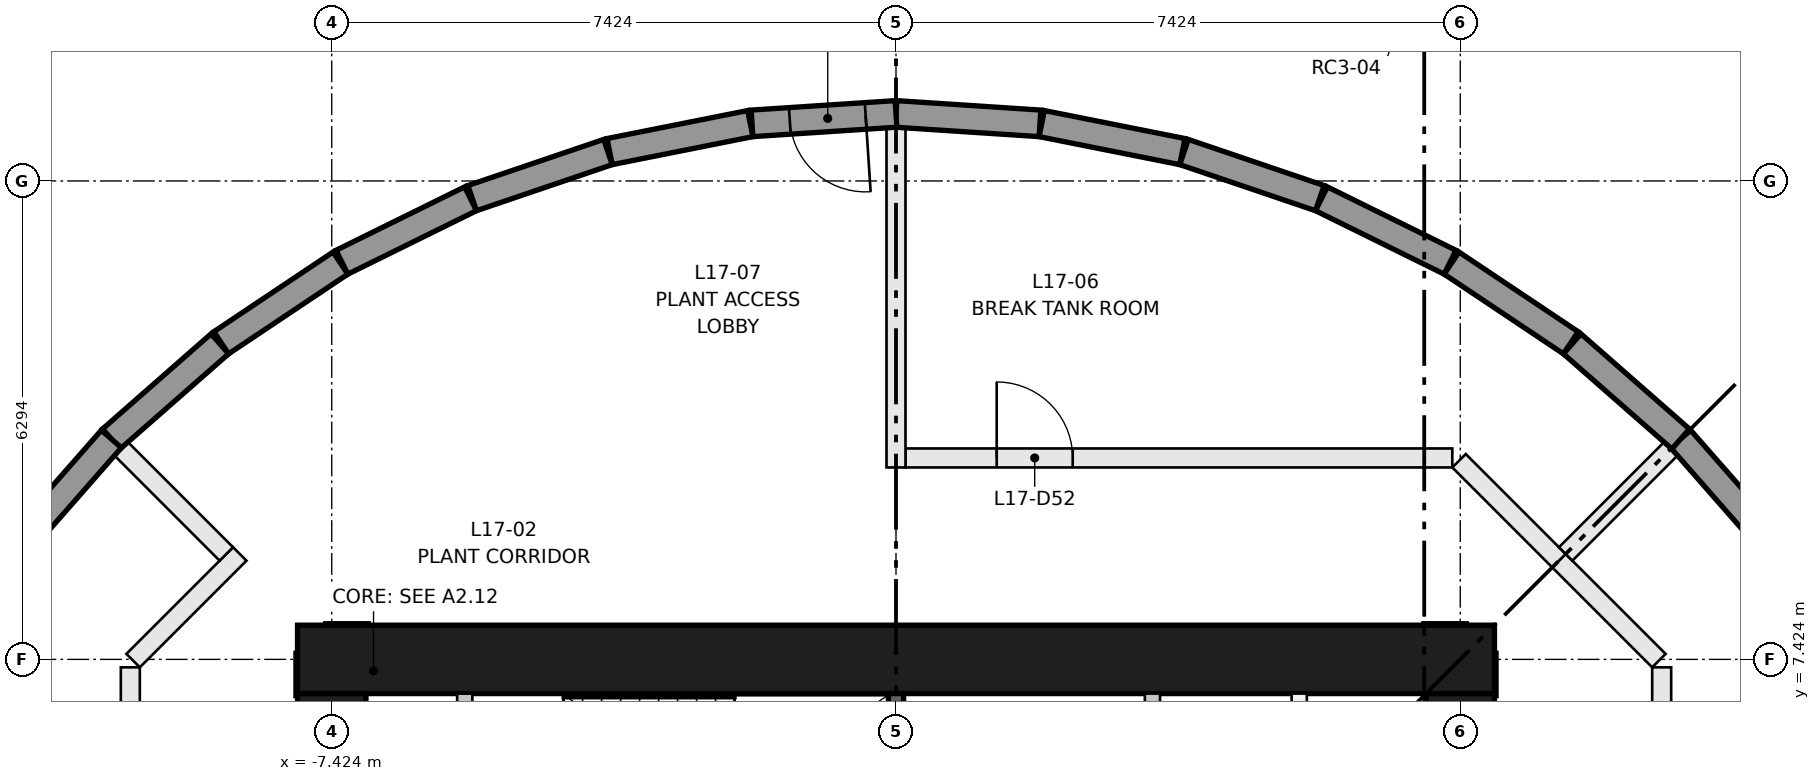
"""IFC4 building model, lengths in metres.
Left out: names, types, materials, properties, quantities, classifications, styles, units other than length and angle.
Written with IfcOpenShell. Run it as: python <this file> out.ifc"""

import sys

from ifc_helpers import new_model, si_unit, direction, frame, frame_2d, origin, place, context, subcontext, project, spatial, rectangle, extrude, element, fill, save


model = new_model("IFC4")
c1 = context("Model", 3, precision=1e-05, world=origin(), true_north=direction((0.0, 1.0)))
c2 = subcontext(c1, "Body", "Model", "MODEL_VIEW")
j1 = project(units=[si_unit("LENGTHUNIT", "METRE"), si_unit("PLANEANGLEUNIT", "RADIAN")], contexts=[c1])
p1 = place(None, origin())
s1 = spatial("IfcSite", under=j1, at=p1, CompositionType="ELEMENT")
p2 = place(p1, origin())
s2 = spatial("IfcBuilding", under=s1, at=p2, CompositionType="ELEMENT")
p3 = place(p2, frame((0.0, 0.0, 66.35)))
s3 = spatial("IfcBuildingStorey", under=s2, at=p3, CompositionType="ELEMENT", Elevation=66.35)
p4 = place(p3, frame((-7.874, 7.424, 0.0), z_axis=(0.0, 0.0, 1.0), x_axis=(1.0, 0.0, 0.0)))
e1 = element("IfcWall", 1, at=p4, inside=s3, PredefinedType="SHEAR", context=c2, shape_type="SweptSolid", body=[
    extrude(rectangle(XDim=15.748, YDim=0.9, at=frame_2d((7.874, 0.0))), origin(), (0.0, 0.0, 1.0), 6.4),
])
p5 = place(p3, frame((-7.424, -6.974, 0.0), z_axis=(0.0, 0.0, 1.0), x_axis=(0.0, 1.0, 0.0)))
e2 = element("IfcWall", 2, at=p5, inside=s3, PredefinedType="SHEAR", context=c2, shape_type="SweptSolid", body=[
    extrude(rectangle(XDim=13.948, YDim=0.9, at=frame_2d((6.974, 0.0))), origin(), (0.0, 0.0, 1.0), 6.4),
])
p6 = place(p5, frame((6.474, 0.0, 0.0)))
e3 = element("IfcOpeningElement", 3, at=p6, cuts=e2, PredefinedType="OPENING", context=c2, shape_type="SweptSolid", body=[
    extrude(rectangle(XDim=1.0, YDim=2.1, at=frame_2d((0.5, 1.05))), frame((0.0, 0.46, 0.0), z_axis=(0.0, -1.0, 0.0), x_axis=(1.0, 0.0, 0.0)), (0.0, 0.0, 1.0), 0.92),
])
p7 = place(p5, frame((3.35, 0.0, 0.0)))
e4 = element("IfcOpeningElement", 4, at=p7, cuts=e2, PredefinedType="OPENING", context=c2, shape_type="SweptSolid", body=[
    extrude(rectangle(XDim=1.8, YDim=2.1, at=frame_2d((0.9, 1.05))), frame((0.0, 0.46, 0.0), z_axis=(0.0, -1.0, 0.0), x_axis=(1.0, 0.0, 0.0)), (0.0, 0.0, 1.0), 0.92),
])
p8 = place(p5, frame((8.799, 0.0, 0.0)))
e5 = element("IfcOpeningElement", 5, at=p8, cuts=e2, PredefinedType="OPENING", context=c2, shape_type="SweptSolid", body=[
    extrude(rectangle(XDim=1.8, YDim=2.1, at=frame_2d((0.9, 1.05))), frame((0.0, 0.46, 0.0), z_axis=(0.0, -1.0, 0.0), x_axis=(1.0, 0.0, 0.0)), (0.0, 0.0, 1.0), 0.92),
])
p9 = place(p5, frame((11.974, 0.0, 0.0)))
e6 = element("IfcOpeningElement", 6, at=p9, cuts=e2, PredefinedType="OPENING", context=c2, shape_type="SweptSolid", body=[
    extrude(rectangle(XDim=1.0, YDim=2.1, at=frame_2d((0.5, 1.05))), frame((0.0, 0.46, 0.0), z_axis=(0.0, -1.0, 0.0), x_axis=(1.0, 0.0, 0.0)), (0.0, 0.0, 1.0), 0.92),
])
p10 = place(p3, frame((7.424, -6.974, 0.0), z_axis=(0.0, 0.0, 1.0), x_axis=(0.0, 1.0, 0.0)))
e7 = element("IfcWall", 7, at=p10, inside=s3, PredefinedType="SHEAR", context=c2, shape_type="SweptSolid", body=[
    extrude(rectangle(XDim=13.948, YDim=0.9, at=frame_2d((6.974, 0.0))), origin(), (0.0, 0.0, 1.0), 6.4),
])
p11 = place(p10, frame((6.474, 0.0, 0.0)))
e8 = element("IfcOpeningElement", 8, at=p11, cuts=e7, PredefinedType="OPENING", context=c2, shape_type="SweptSolid", body=[
    extrude(rectangle(XDim=1.0, YDim=2.1, at=frame_2d((0.5, 1.05))), frame((0.0, 0.46, 0.0), z_axis=(0.0, -1.0, 0.0), x_axis=(1.0, 0.0, 0.0)), (0.0, 0.0, 1.0), 0.92),
])
p12 = place(p10, frame((3.35, 0.0, 0.0)))
e9 = element("IfcOpeningElement", 9, at=p12, cuts=e7, PredefinedType="OPENING", context=c2, shape_type="SweptSolid", body=[
    extrude(rectangle(XDim=1.8, YDim=2.1, at=frame_2d((0.9, 1.05))), frame((0.0, 0.46, 0.0), z_axis=(0.0, -1.0, 0.0), x_axis=(1.0, 0.0, 0.0)), (0.0, 0.0, 1.0), 0.92),
])
p13 = place(p10, frame((8.799, 0.0, 0.0)))
e10 = element("IfcOpeningElement", 10, at=p13, cuts=e7, PredefinedType="OPENING", context=c2, shape_type="SweptSolid", body=[
    extrude(rectangle(XDim=1.8, YDim=2.1, at=frame_2d((0.9, 1.05))), frame((0.0, 0.46, 0.0), z_axis=(0.0, -1.0, 0.0), x_axis=(1.0, 0.0, 0.0)), (0.0, 0.0, 1.0), 0.92),
])
p14 = place(p3, frame((0.0, 5.574, 0.0), z_axis=(0.0, 0.0, 1.0), x_axis=(0.0, 1.0, 0.0)))
e11 = element("IfcWall", 11, at=p14, inside=s3, PredefinedType="SHEAR", context=c2, shape_type="SweptSolid", body=[
    extrude(rectangle(XDim=1.4, YDim=0.2, at=frame_2d((0.7, 0.0))), origin(), (0.0, 0.0, 1.0), 6.05),
])
for number, where, z_axis, x_axis in (
    (12, (3.374, 4.174, 0.0), (0.0, 0.0, 1.0), (0.0, 1.0, 0.0)),
    (13, (5.305, 4.174, 0.0), (0.0, 0.0, 1.0), (0.0, 1.0, 0.0)),
):
    element("IfcWall", number, at=place(p3, frame(where, z_axis=z_axis, x_axis=x_axis)), inside=s3, PredefinedType="PARTITIONING", context=c2, shape_type="SweptSolid", body=[
        extrude(rectangle(XDim=2.8, YDim=0.2, at=frame_2d((1.4, 0.0))), origin(), (0.0, 0.0, 1.0), 6.05),
    ])
p15 = place(p3, frame((-5.674, 4.174, 0.0), z_axis=(0.0, 0.0, 1.0), x_axis=(0.0, 1.0, 0.0)))
e14 = element("IfcWall", 14, at=p15, inside=s3, PredefinedType="PARTITIONING", context=c2, shape_type="SweptSolid", body=[
    extrude(rectangle(XDim=2.8, YDim=0.2, at=frame_2d((1.4, 0.0))), origin(), (0.0, 0.0, 1.0), 6.05),
])
p16 = place(p15, frame((0.125, 0.0, 0.0)))
e15 = element("IfcOpeningElement", 15, at=p16, cuts=e14, PredefinedType="OPENING", context=c2, shape_type="SweptSolid", body=[
    extrude(rectangle(XDim=0.95, YDim=2.1, at=frame_2d((0.475, 1.05))), frame((0.0, 0.11, 0.0), z_axis=(0.0, -1.0, 0.0), x_axis=(1.0, 0.0, 0.0)), (0.0, 0.0, 1.0), 0.22),
])
p17 = place(p15, frame((1.725, 0.0, 0.0)))
e16 = element("IfcOpeningElement", 16, at=p17, cuts=e14, PredefinedType="OPENING", context=c2, shape_type="SweptSolid", body=[
    extrude(rectangle(XDim=0.95, YDim=2.1, at=frame_2d((0.475, 1.05))), frame((0.0, 0.11, 0.0), z_axis=(0.0, -1.0, 0.0), x_axis=(1.0, 0.0, 0.0)), (0.0, 0.0, 1.0), 0.22),
])
p18 = place(p3, frame((8.722, 8.722, 0.0), z_axis=(0.0, 0.0, 1.0), x_axis=(0.707172427269, -0.707041129009, 0.0)))
e17 = element("IfcWall", 17, at=p18, inside=s3, PredefinedType="PARTITIONING", context=c2, shape_type="SweptSolid", body=[
    extrude(rectangle(XDim=1.859, YDim=0.25, at=frame_2d((0.93, 0.0))), origin(), (0.0, 0.0, 1.0), 6.05),
])
p19 = place(p3, frame((10.074, 7.319, 0.0), z_axis=(0.0, 0.0, 1.0), x_axis=(0.0, -1.0, 0.0)))
e18 = element("IfcWall", 18, at=p19, inside=s3, PredefinedType="PARTITIONING", context=c2, shape_type="SweptSolid", body=[
    extrude(rectangle(XDim=7.319, YDim=0.25, at=frame_2d((3.66, 0.0))), origin(), (0.0, 0.0, 1.0), 6.05),
])
p20 = place(p19, frame((5.0, 0.0, 0.0)))
e19 = element("IfcOpeningElement", 19, at=p20, cuts=e18, PredefinedType="OPENING", context=c2, shape_type="SweptSolid", body=[
    extrude(rectangle(XDim=1.0, YDim=2.1, at=frame_2d((0.5, 1.05))), frame((0.0, 0.135, 0.0), z_axis=(0.0, -1.0, 0.0), x_axis=(1.0, 0.0, 0.0)), (0.0, 0.0, 1.0), 0.27),
])
p21 = place(p3, frame((0.125, 10.074, 0.0), z_axis=(0.0, 0.0, 1.0), x_axis=(1.0, 0.0, 0.0)))
e20 = element("IfcWall", 20, at=p21, inside=s3, PredefinedType="PARTITIONING", context=c2, shape_type="SweptSolid", body=[
    extrude(rectangle(XDim=7.194, YDim=0.25, at=frame_2d((3.597, 0.0))), origin(), (0.0, 0.0, 1.0), 6.05),
])
p22 = place(p21, frame((1.2, 0.0, 0.0)))
e21 = element("IfcOpeningElement", 21, at=p22, cuts=e20, PredefinedType="OPENING", context=c2, shape_type="SweptSolid", body=[
    extrude(rectangle(XDim=1.0, YDim=2.1, at=frame_2d((0.5, 1.05))), frame((0.0, 0.135, 0.0), z_axis=(0.0, -1.0, 0.0), x_axis=(1.0, 0.0, 0.0)), (0.0, 0.0, 1.0), 0.27),
])
p23 = place(p3, frame((7.408, 10.037, 0.0), z_axis=(0.0, 0.0, 1.0), x_axis=(0.707041129009, -0.707172427269, 0.0)))
e22 = element("IfcWall", 22, at=p23, inside=s3, PredefinedType="PARTITIONING", context=c2, shape_type="SweptSolid", body=[
    extrude(rectangle(XDim=1.859, YDim=0.25, at=frame_2d((0.93, 0.0))), origin(), (0.0, 0.0, 1.0), 6.05),
])
p24 = place(p3, frame((-10.074, 0.0, 0.0), z_axis=(0.0, 0.0, 1.0), x_axis=(0.0, 1.0, 0.0)))
e23 = element("IfcWall", 23, at=p24, inside=s3, PredefinedType="PARTITIONING", context=c2, shape_type="SweptSolid", body=[
    extrude(rectangle(XDim=7.319, YDim=0.25, at=frame_2d((3.66, 0.0))), origin(), (0.0, 0.0, 1.0), 6.05),
])
p25 = place(p24, frame((1.3, 0.0, 0.0)))
e24 = element("IfcOpeningElement", 24, at=p25, cuts=e23, PredefinedType="OPENING", context=c2, shape_type="SweptSolid", body=[
    extrude(rectangle(XDim=1.0, YDim=2.1, at=frame_2d((0.5, 1.05))), frame((0.0, 0.135, 0.0), z_axis=(0.0, -1.0, 0.0), x_axis=(1.0, 0.0, 0.0)), (0.0, 0.0, 1.0), 0.27),
])
p26 = place(p3, frame((-10.037, 7.408, 0.0), z_axis=(0.0, 0.0, 1.0), x_axis=(0.707168292802, 0.70704526422, 0.0)))
e25 = element("IfcWall", 25, at=p26, inside=s3, PredefinedType="PARTITIONING", context=c2, shape_type="SweptSolid", body=[
    extrude(rectangle(XDim=1.984, YDim=0.25, at=frame_2d((0.992, 0.0))), origin(), (0.0, 0.0, 1.0), 6.05),
])
p27 = place(p3, frame((10.324, 10.324, 0.0), z_axis=(0.0, 0.0, 1.0), x_axis=(0.659360034108, -0.751827337506, 0.0)))
e26 = element("IfcWall", 26, at=p27, inside=s3, PredefinedType="PARTITIONING", context=c2, shape_type="SweptSolid", body=[
    extrude(rectangle(XDim=1.898, YDim=0.35, at=frame_2d((0.949, 0.0))), origin(), (0.0, 0.0, 1.0), 6.05),
])
p28 = place(p3, frame((8.811, 8.811, 0.0), z_axis=(0.0, 0.0, 1.0), x_axis=(0.707106781187, 0.707106781187, 0.0)))
e27 = element("IfcWall", 27, at=p28, inside=s3, PredefinedType="PARTITIONING", context=c2, shape_type="SweptSolid", body=[
    extrude(rectangle(XDim=1.956, YDim=0.25, at=frame_2d((0.978, 0.0))), origin(), (0.0, 0.0, 1.0), 6.05),
])
p29 = place(p3, frame((0.0, 14.6, 0.0), z_axis=(0.0, 0.0, 1.0), x_axis=(0.997855159135, -0.065460533058, 0.0)))
e28 = element("IfcWall", 28, at=p29, inside=s3, PredefinedType="PARTITIONING", context=c2, shape_type="SweptSolid", body=[
    extrude(rectangle(XDim=1.898, YDim=0.35, at=frame_2d((0.949, 0.0))), origin(), (0.0, 0.0, 1.0), 6.05),
])
p30 = place(p3, frame((1.917, 14.473, 0.0), z_axis=(0.0, 0.0, 1.0), x_axis=(0.980779232714, -0.195120723342, 0.0)))
e29 = element("IfcWall", 29, at=p30, inside=s3, PredefinedType="PARTITIONING", context=c2, shape_type="SweptSolid", body=[
    extrude(rectangle(XDim=1.887, YDim=0.35, at=frame_2d((0.943, 0.0))), origin(), (0.0, 0.0, 1.0), 6.05),
])
for number, where, z_axis, x_axis in (
    (30, (3.79, 14.099, 0.0), (0.0, 0.0, 1.0), (0.947, -0.322, 0.0)),
    (31, (5.597, 13.483, 0.0), (0.0, 0.0, 1.0), (0.897, -0.442, 0.0)),
):
    element("IfcWall", number, at=place(p3, frame(where, z_axis=z_axis, x_axis=x_axis)), inside=s3, PredefinedType="PARTITIONING", context=c2, shape_type="SweptSolid", body=[
        extrude(rectangle(XDim=1.887, YDim=0.35, at=frame_2d((0.943, 0.0))), origin(), (0.0, 0.0, 1.0), 6.05),
    ])
p31 = place(p3, frame((7.31, 12.638, 0.0), z_axis=(0.0, 0.0, 1.0), x_axis=(0.831452632931, -0.555595643605, 0.0)))
e32 = element("IfcWall", 32, at=p31, inside=s3, PredefinedType="PARTITIONING", context=c2, shape_type="SweptSolid", body=[
    extrude(rectangle(XDim=1.887, YDim=0.35, at=frame_2d((0.943, 0.0))), origin(), (0.0, 0.0, 1.0), 6.05),
])
p32 = place(p3, frame((8.896, 11.575, 0.0), z_axis=(0.0, 0.0, 1.0), x_axis=(0.751827337506, -0.659360034108, 0.0)))
e33 = element("IfcWall", 33, at=p32, inside=s3, PredefinedType="PARTITIONING", context=c2, shape_type="SweptSolid", body=[
    extrude(rectangle(XDim=1.898, YDim=0.35, at=frame_2d((0.949, 0.0))), origin(), (0.0, 0.0, 1.0), 6.05),
])
p33 = place(p3, frame((0.0, 9.949, 0.0), z_axis=(0.0, 0.0, 1.0), x_axis=(0.0, 1.0, 0.0)))
e34 = element("IfcWall", 34, at=p33, inside=s3, PredefinedType="PARTITIONING", context=c2, shape_type="SweptSolid", body=[
    extrude(rectangle(XDim=4.468, YDim=0.25, at=frame_2d((2.234, 0.0))), origin(), (0.0, 0.0, 1.0), 6.05),
])
p34 = place(p3, frame((-10.324, 10.324, 0.0), z_axis=(0.0, 0.0, 1.0), x_axis=(0.751827337506, 0.659360034108, 0.0)))
e35 = element("IfcWall", 35, at=p34, inside=s3, PredefinedType="PARTITIONING", context=c2, shape_type="SweptSolid", body=[
    extrude(rectangle(XDim=1.898, YDim=0.35, at=frame_2d((0.949, 0.0))), origin(), (0.0, 0.0, 1.0), 6.05),
])
p35 = place(p3, frame((-8.878, 11.589, 0.0), z_axis=(0.0, 0.0, 1.0), x_axis=(0.831452632931, 0.555595643605, 0.0)))
e36 = element("IfcWall", 36, at=p35, inside=s3, PredefinedType="PARTITIONING", context=c2, shape_type="SweptSolid", body=[
    extrude(rectangle(XDim=1.887, YDim=0.35, at=frame_2d((0.943, 0.0))), origin(), (0.0, 0.0, 1.0), 6.05),
])
for number, where, z_axis, x_axis in (
    (37, (-7.29, 12.649, 0.0), (0.0, 0.0, 1.0), (0.897, 0.442, 0.0)),
    (38, (-5.576, 13.492, 0.0), (0.0, 0.0, 1.0), (0.947, 0.322, 0.0)),
):
    element("IfcWall", number, at=place(p3, frame(where, z_axis=z_axis, x_axis=x_axis)), inside=s3, PredefinedType="PARTITIONING", context=c2, shape_type="SweptSolid", body=[
        extrude(rectangle(XDim=1.887, YDim=0.35, at=frame_2d((0.943, 0.0))), origin(), (0.0, 0.0, 1.0), 6.05),
    ])
p36 = place(p3, frame((-3.768, 14.105, 0.0), z_axis=(0.0, 0.0, 1.0), x_axis=(0.980779232714, 0.195120723342, 0.0)))
e39 = element("IfcWall", 39, at=p36, inside=s3, PredefinedType="PARTITIONING", context=c2, shape_type="SweptSolid", body=[
    extrude(rectangle(XDim=1.887, YDim=0.35, at=frame_2d((0.943, 0.0))), origin(), (0.0, 0.0, 1.0), 6.05),
])
p37 = place(p3, frame((0.0, 14.6, 0.0), z_axis=(0.0, 0.0, 1.0), x_axis=(-0.997855159135, -0.065460533058, 0.0)))
e40 = element("IfcWall", 40, at=p37, inside=s3, PredefinedType="PARTITIONING", context=c2, shape_type="SweptSolid", body=[
    extrude(rectangle(XDim=1.898, YDim=0.35, at=frame_2d((0.949, 0.0))), origin(), (0.0, 0.0, 1.0), 6.05),
])
p38 = place(p37, frame((0.4, 0.0, 0.0)))
e41 = element("IfcOpeningElement", 41, at=p38, cuts=e40, PredefinedType="OPENING", context=c2, shape_type="SweptSolid", body=[
    extrude(rectangle(XDim=1.0, YDim=2.1, at=frame_2d((0.5, 1.05))), frame((0.0, 0.185, 0.0), z_axis=(0.0, -1.0, 0.0), x_axis=(1.0, 0.0, 0.0)), (0.0, 0.0, 1.0), 0.37),
])
p39 = place(p3, frame((-8.811, 8.811, 0.0), z_axis=(0.0, 0.0, 1.0), x_axis=(-0.707106781187, 0.707106781187, 0.0)))
e42 = element("IfcWall", 42, at=p39, inside=s3, PredefinedType="PARTITIONING", context=c2, shape_type="SweptSolid", body=[
    extrude(rectangle(XDim=1.956, YDim=0.25, at=frame_2d((0.978, 0.0))), origin(), (0.0, 0.0, 1.0), 6.05),
])
p40 = place(p3, frame((-11.575, 8.896, 0.0), z_axis=(0.0, 0.0, 1.0), x_axis=(0.659360034108, 0.751827337506, 0.0)))
e43 = element("IfcWall", 43, at=p40, inside=s3, PredefinedType="PARTITIONING", context=c2, shape_type="SweptSolid", body=[
    extrude(rectangle(XDim=1.898, YDim=0.35, at=frame_2d((0.949, 0.0))), origin(), (0.0, 0.0, 1.0), 6.05),
])
p41 = place(p22, origin())
e44 = element("IfcDoor", 44, at=p41, inside=s3, OperationType="SINGLE_SWING_LEFT", PredefinedType="DOOR", context=c2, shape_type="SweptSolid", body=[
    extrude(rectangle(XDim=1.0, YDim=2.1, at=frame_2d((0.5, 1.05))), frame((0.0, 0.025, 0.0), z_axis=(0.0, -1.0, 0.0), x_axis=(1.0, 0.0, 0.0)), (0.0, 0.0, 1.0), 0.05),
])
fill(e21, e44)
p42 = place(p38, origin())
e45 = element("IfcDoor", 45, at=p42, inside=s3, OperationType="SINGLE_SWING_LEFT", PredefinedType="DOOR", context=c2, shape_type="SweptSolid", body=[
    extrude(rectangle(XDim=1.0, YDim=2.1, at=frame_2d((0.5, 1.05))), frame((0.0, 0.025, 0.0), z_axis=(0.0, -1.0, 0.0), x_axis=(1.0, 0.0, 0.0)), (0.0, 0.0, 1.0), 0.05),
])
fill(e41, e45)
save(model, sys.argv[1])
